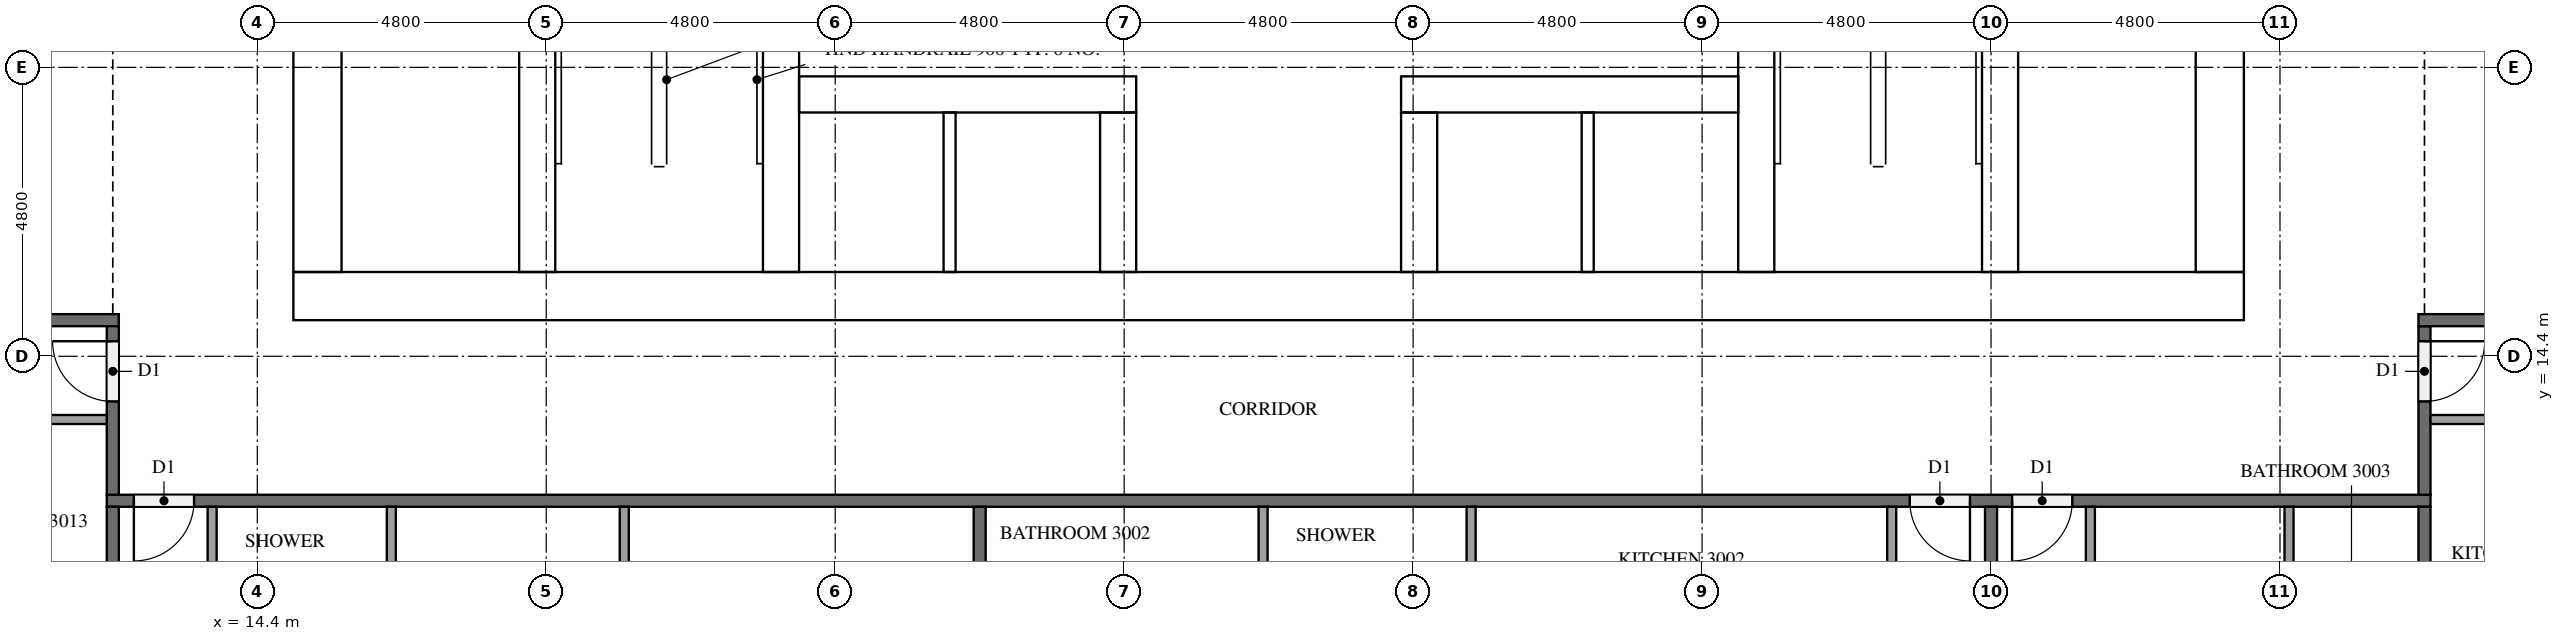
"""IFC4 building model, lengths in metres.
Left out: names, types, materials, properties, quantities, classifications, styles, units other than length and angle.
Written with IfcOpenShell. Run it as: python <this file> out.ifc"""

import sys

from ifc_helpers import new_model, si_unit, direction, frame, frame_2d, origin, place, context, subcontext, project, spatial, rectangle, extrude, element, fill, save


model = new_model("IFC4")
c1 = context("Model", 3, precision=1e-05, world=origin(), true_north=direction((0.0, 1.0)))
c2 = subcontext(c1, "Body", "Model", "MODEL_VIEW")
j1 = project(units=[si_unit("LENGTHUNIT", "METRE"), si_unit("PLANEANGLEUNIT", "RADIAN")], contexts=[c1])
p1 = place(None, origin())
s1 = spatial("IfcSite", under=j1, at=p1, CompositionType="ELEMENT")
p2 = place(p1, origin())
s2 = spatial("IfcBuilding", under=s1, at=p2, CompositionType="ELEMENT")
p3 = place(p2, frame((0.0, 0.0, 119.1)))
s3 = spatial("IfcBuildingStorey", under=s2, at=p3, CompositionType="ELEMENT", Elevation=119.1)
p4 = place(p3, frame((15.0, 15.4, 0.0), z_axis=(0.0, 0.0, 1.0), x_axis=(1.0, 0.0, 0.0)))
e1 = element("IfcWall", 1, at=p4, inside=s3, PredefinedType="SHEAR", context=c2, shape_type="SweptSolid", body=[
    extrude(rectangle(XDim=32.4, YDim=0.8, at=frame_2d((16.2, 0.0))), origin(), (0.0, 0.0, 1.0), 3.2),
])
p5 = place(p4, frame((15.3, 0.0, 0.0)))
e2 = element("IfcOpeningElement", 2, at=p5, cuts=e1, PredefinedType="OPENING", context=c2, shape_type="SweptSolid", body=[
    extrude(rectangle(XDim=1.8, YDim=2.1, at=frame_2d((0.9, 1.05))), frame((0.0, 0.41, 0.0), z_axis=(0.0, -1.0, 0.0), x_axis=(1.0, 0.0, 0.0)), (0.0, 0.0, 1.0), 0.82),
])
p6 = place(p3, frame((15.4, 15.8, 0.0), z_axis=(0.0, 0.0, 1.0), x_axis=(0.0, 1.0, 0.0)))
e3 = element("IfcWall", 3, at=p6, inside=s3, PredefinedType="SHEAR", context=c2, shape_type="SweptSolid", body=[
    extrude(rectangle(XDim=21.2, YDim=0.8, at=frame_2d((10.6, 0.0))), origin(), (0.0, 0.0, 1.0), 3.2),
])
p7 = place(p6, frame((4.96, 0.0, 0.0)))
e4 = element("IfcOpeningElement", 4, at=p7, cuts=e3, PredefinedType="OPENING", context=c2, shape_type="SweptSolid", body=[
    extrude(rectangle(XDim=1.2, YDim=2.1, at=frame_2d((0.6, 1.05))), frame((0.0, 0.41, 0.0), z_axis=(0.0, -1.0, 0.0), x_axis=(1.0, 0.0, 0.0)), (0.0, 0.0, 1.0), 0.82),
])
p8 = place(p3, frame((47.0, 15.8, 0.0), z_axis=(0.0, 0.0, 1.0), x_axis=(0.0, 1.0, 0.0)))
e5 = element("IfcWall", 5, at=p8, inside=s3, PredefinedType="SHEAR", context=c2, shape_type="SweptSolid", body=[
    extrude(rectangle(XDim=21.2, YDim=0.8, at=frame_2d((10.6, 0.0))), origin(), (0.0, 0.0, 1.0), 3.2),
])
p9 = place(p8, frame((10.3, 0.0, 0.0)))
e6 = element("IfcOpeningElement", 6, at=p9, cuts=e5, PredefinedType="OPENING", context=c2, shape_type="SweptSolid", body=[
    extrude(rectangle(XDim=1.2, YDim=2.1, at=frame_2d((0.6, 1.05))), frame((0.0, 0.41, 0.0), z_axis=(0.0, -1.0, 0.0), x_axis=(1.0, 0.0, 0.0)), (0.0, 0.0, 1.0), 0.82),
])
p10 = place(p3, frame((19.05, 15.8, 0.0), z_axis=(0.0, 0.0, 1.0), x_axis=(0.0, 1.0, 0.0)))
e7 = element("IfcWall", 7, at=p10, inside=s3, PredefinedType="SHEAR", context=c2, shape_type="SweptSolid", body=[
    extrude(rectangle(XDim=15.15, YDim=0.6, at=frame_2d((7.575, 0.0))), origin(), (0.0, 0.0, 1.0), 3.2),
])
p11 = place(p10, frame((9.65, 0.0, 0.0)))
e8 = element("IfcOpeningElement", 8, at=p11, cuts=e7, PredefinedType="OPENING", context=c2, shape_type="SweptSolid", body=[
    extrude(rectangle(XDim=1.1, YDim=2.1, at=frame_2d((0.55, 1.05))), frame((0.0, 0.31, 0.0), z_axis=(0.0, -1.0, 0.0), x_axis=(1.0, 0.0, 0.0)), (0.0, 0.0, 1.0), 0.62),
])
p12 = place(p10, frame((13.15, 0.0, 0.0)))
e9 = element("IfcOpeningElement", 9, at=p12, cuts=e7, PredefinedType="OPENING", context=c2, shape_type="SweptSolid", body=[
    extrude(rectangle(XDim=1.1, YDim=2.1, at=frame_2d((0.55, 1.05))), frame((0.0, 0.31, 0.0), z_axis=(0.0, -1.0, 0.0), x_axis=(1.0, 0.0, 0.0)), (0.0, 0.0, 1.0), 0.62),
])
p13 = place(p10, frame((0.4, 0.0, 0.0)))
e10 = element("IfcOpeningElement", 10, at=p13, cuts=e7, PredefinedType="OPENING", context=c2, shape_type="SweptSolid", body=[
    extrude(rectangle(XDim=1.2, YDim=2.1, at=frame_2d((0.6, 1.05))), frame((0.0, 0.31, 0.0), z_axis=(0.0, -1.0, 0.0), x_axis=(1.0, 0.0, 0.0)), (0.0, 0.0, 1.0), 0.62),
])
p14 = place(p3, frame((23.1, 15.8, 0.0), z_axis=(0.0, 0.0, 1.0), x_axis=(0.0, 1.0, 0.0)))
e11 = element("IfcWall", 11, at=p14, inside=s3, PredefinedType="SHEAR", context=c2, shape_type="SweptSolid", body=[
    extrude(rectangle(XDim=21.2, YDim=0.6, at=frame_2d((10.6, 0.0))), origin(), (0.0, 0.0, 1.0), 3.2),
])
p15 = place(p3, frame((39.3, 15.8, 0.0), z_axis=(0.0, 0.0, 1.0), x_axis=(0.0, 1.0, 0.0)))
e12 = element("IfcWall", 12, at=p15, inside=s3, PredefinedType="SHEAR", context=c2, shape_type="SweptSolid", body=[
    extrude(rectangle(XDim=8.45, YDim=0.6, at=frame_2d((4.225, 0.0))), origin(), (0.0, 0.0, 1.0), 3.2),
])
p16 = place(p3, frame((43.35, 15.8, 0.0), z_axis=(0.0, 0.0, 1.0), x_axis=(0.0, 1.0, 0.0)))
e13 = element("IfcWall", 13, at=p16, inside=s3, PredefinedType="SHEAR", context=c2, shape_type="SweptSolid", body=[
    extrude(rectangle(XDim=8.45, YDim=0.6, at=frame_2d((4.225, 0.0))), origin(), (0.0, 0.0, 1.0), 3.2),
])
p17 = place(p16, frame((0.4, 0.0, 0.0)))
e14 = element("IfcOpeningElement", 14, at=p17, cuts=e13, PredefinedType="OPENING", context=c2, shape_type="SweptSolid", body=[
    extrude(rectangle(XDim=1.2, YDim=2.1, at=frame_2d((0.6, 1.05))), frame((0.0, 0.31, 0.0), z_axis=(0.0, -1.0, 0.0), x_axis=(1.0, 0.0, 0.0)), (0.0, 0.0, 1.0), 0.62),
])
p18 = place(p3, frame((23.4, 18.75, 0.0), z_axis=(0.0, 0.0, 1.0), x_axis=(1.0, 0.0, 0.0)))
e15 = element("IfcWall", 15, at=p18, inside=s3, PredefinedType="SHEAR", context=c2, shape_type="SweptSolid", body=[
    extrude(rectangle(XDim=5.6, YDim=0.6, at=frame_2d((2.8, 0.0))), origin(), (0.0, 0.0, 1.0), 3.2),
])
p19 = place(p18, frame((0.65, 0.0, 0.0)))
e16 = element("IfcOpeningElement", 16, at=p19, cuts=e15, PredefinedType="OPENING", context=c2, shape_type="SweptSolid", body=[
    extrude(rectangle(XDim=1.1, YDim=2.1, at=frame_2d((0.55, 1.05))), frame((0.0, 0.31, 0.0), z_axis=(0.0, -1.0, 0.0), x_axis=(1.0, 0.0, 0.0)), (0.0, 0.0, 1.0), 0.62),
])
p20 = place(p18, frame((3.25, 0.0, 0.0)))
e17 = element("IfcOpeningElement", 17, at=p20, cuts=e15, PredefinedType="OPENING", context=c2, shape_type="SweptSolid", body=[
    extrude(rectangle(XDim=1.1, YDim=2.1, at=frame_2d((0.55, 1.05))), frame((0.0, 0.31, 0.0), z_axis=(0.0, -1.0, 0.0), x_axis=(1.0, 0.0, 0.0)), (0.0, 0.0, 1.0), 0.62),
])
p21 = place(p3, frame((33.4, 18.75, 0.0), z_axis=(0.0, 0.0, 1.0), x_axis=(1.0, 0.0, 0.0)))
e18 = element("IfcWall", 18, at=p21, inside=s3, PredefinedType="SHEAR", context=c2, shape_type="SweptSolid", body=[
    extrude(rectangle(XDim=5.6, YDim=0.6, at=frame_2d((2.8, 0.0))), origin(), (0.0, 0.0, 1.0), 3.2),
])
p22 = place(p21, frame((1.25, 0.0, 0.0)))
e19 = element("IfcOpeningElement", 19, at=p22, cuts=e18, PredefinedType="OPENING", context=c2, shape_type="SweptSolid", body=[
    extrude(rectangle(XDim=1.1, YDim=2.1, at=frame_2d((0.55, 1.05))), frame((0.0, 0.31, 0.0), z_axis=(0.0, -1.0, 0.0), x_axis=(1.0, 0.0, 0.0)), (0.0, 0.0, 1.0), 0.62),
])
p23 = place(p21, frame((3.85, 0.0, 0.0)))
e20 = element("IfcOpeningElement", 20, at=p23, cuts=e18, PredefinedType="OPENING", context=c2, shape_type="SweptSolid", body=[
    extrude(rectangle(XDim=1.1, YDim=2.1, at=frame_2d((0.55, 1.05))), frame((0.0, 0.31, 0.0), z_axis=(0.0, -1.0, 0.0), x_axis=(1.0, 0.0, 0.0)), (0.0, 0.0, 1.0), 0.62),
])
for number, where, z_axis, x_axis in (
    (21, (28.7, 15.8, 0.0), (0.0, 0.0, 1.0), (0.0, 1.0, 0.0)),
    (22, (33.7, 15.8, 0.0), (0.0, 0.0, 1.0), (0.0, 1.0, 0.0)),
):
    element("IfcWall", number, at=place(p3, frame(where, z_axis=z_axis, x_axis=x_axis)), inside=s3, PredefinedType="SHEAR", context=c2, shape_type="SweptSolid", body=[
        extrude(rectangle(XDim=2.65, YDim=0.6, at=frame_2d((1.325, 0.0))), origin(), (0.0, 0.0, 1.0), 3.2),
    ])
for number, where, z_axis, x_axis in (
    (23, (25.9, 15.8, 0.0), (0.0, 0.0, 1.0), (0.0, 1.0, 0.0)),
    (24, (36.5, 15.8, 0.0), (0.0, 0.0, 1.0), (0.0, 1.0, 0.0)),
):
    element("IfcWall", number, at=place(p3, frame(where, z_axis=z_axis, x_axis=x_axis)), inside=s3, PredefinedType="SOLIDWALL", context=c2, shape_type="SweptSolid", body=[
        extrude(rectangle(XDim=2.65, YDim=0.2, at=frame_2d((1.325, 0.0))), origin(), (0.0, 0.0, 1.0), 3.2),
    ])
p24 = place(p3, frame((50.5, 12.0, 0.0), z_axis=(0.0, 0.0, 1.0), x_axis=(-1.0, 0.0, 0.0)))
e25 = element("IfcWall", 25, at=p24, inside=s3, PredefinedType="PARTITIONING", context=c2, shape_type="SweptSolid", body=[
    extrude(rectangle(XDim=38.6, YDim=0.2, at=frame_2d((19.3, 0.0))), origin(), (0.0, 0.0, 1.0), 3.2),
])
p25 = place(p24, frame((37.15, 0.0, 0.0)))
e26 = element("IfcOpeningElement", 26, at=p25, cuts=e25, PredefinedType="OPENING", context=c2, shape_type="SweptSolid", body=[
    extrude(rectangle(XDim=1.0, YDim=2.1, at=frame_2d((0.5, 1.05))), frame((0.0, 0.11, 0.0), z_axis=(0.0, -1.0, 0.0), x_axis=(1.0, 0.0, 0.0)), (0.0, 0.0, 1.0), 0.22),
])
p26 = place(p24, frame((7.65, 0.0, 0.0)))
e27 = element("IfcOpeningElement", 27, at=p26, cuts=e25, PredefinedType="OPENING", context=c2, shape_type="SweptSolid", body=[
    extrude(rectangle(XDim=1.0, YDim=2.1, at=frame_2d((0.5, 1.05))), frame((0.0, 0.11, 0.0), z_axis=(0.0, -1.0, 0.0), x_axis=(1.0, 0.0, 0.0)), (0.0, 0.0, 1.0), 0.22),
])
p27 = place(p24, frame((5.95, 0.0, 0.0)))
e28 = element("IfcOpeningElement", 28, at=p27, cuts=e25, PredefinedType="OPENING", context=c2, shape_type="SweptSolid", body=[
    extrude(rectangle(XDim=1.0, YDim=2.1, at=frame_2d((0.5, 1.05))), frame((0.0, 0.11, 0.0), z_axis=(0.0, -1.0, 0.0), x_axis=(1.0, 0.0, 0.0)), (0.0, 0.0, 1.0), 0.22),
])
p28 = place(p3, frame((50.4, 14.9, 0.0), z_axis=(0.0, 0.0, 1.0), x_axis=(0.0, -1.0, 0.0)))
e29 = element("IfcWall", 29, at=p28, inside=s3, PredefinedType="PARTITIONING", context=c2, shape_type="SweptSolid", body=[
    extrude(rectangle(XDim=2.8, YDim=0.2, at=frame_2d((1.4, 0.0))), origin(), (0.0, 0.0, 1.0), 3.2),
])
p29 = place(p28, frame((0.25, 0.0, 0.0)))
e30 = element("IfcOpeningElement", 30, at=p29, cuts=e29, PredefinedType="OPENING", context=c2, shape_type="SweptSolid", body=[
    extrude(rectangle(XDim=1.0, YDim=2.1, at=frame_2d((0.5, 1.05))), frame((0.0, 0.11, 0.0), z_axis=(0.0, -1.0, 0.0), x_axis=(1.0, 0.0, 0.0)), (0.0, 0.0, 1.0), 0.22),
])
p30 = place(p3, frame((50.3, 15.0, 0.0), z_axis=(0.0, 0.0, 1.0), x_axis=(1.0, 0.0, 0.0)))
e31 = element("IfcWall", 31, at=p30, inside=s3, PredefinedType="PARTITIONING", context=c2, shape_type="SweptSolid", body=[
    extrude(rectangle(XDim=2.2, YDim=0.2, at=frame_2d((1.1, 0.0))), origin(), (0.0, 0.0, 1.0), 3.2),
])
p31 = place(p3, frame((9.9, 15.0, 0.0), z_axis=(0.0, 0.0, 1.0), x_axis=(1.0, 0.0, 0.0)))
e32 = element("IfcWall", 32, at=p31, inside=s3, PredefinedType="PARTITIONING", context=c2, shape_type="SweptSolid", body=[
    extrude(rectangle(XDim=2.2, YDim=0.2, at=frame_2d((1.1, 0.0))), origin(), (0.0, 0.0, 1.0), 3.2),
])
p32 = place(p3, frame((12.0, 12.1, 0.0), z_axis=(0.0, 0.0, 1.0), x_axis=(0.0, 1.0, 0.0)))
e33 = element("IfcWall", 33, at=p32, inside=s3, PredefinedType="PARTITIONING", context=c2, shape_type="SweptSolid", body=[
    extrude(rectangle(XDim=2.8, YDim=0.2, at=frame_2d((1.4, 0.0))), origin(), (0.0, 0.0, 1.0), 3.2),
])
p33 = place(p32, frame((1.55, 0.0, 0.0)))
e34 = element("IfcOpeningElement", 34, at=p33, cuts=e33, PredefinedType="OPENING", context=c2, shape_type="SweptSolid", body=[
    extrude(rectangle(XDim=1.0, YDim=2.1, at=frame_2d((0.5, 1.05))), frame((0.0, 0.11, 0.0), z_axis=(0.0, -1.0, 0.0), x_axis=(1.0, 0.0, 0.0)), (0.0, 0.0, 1.0), 0.22),
])
for number, where, z_axis, x_axis in (
    (35, (26.4, 11.9, 0.0), (0.0, 0.0, 1.0), (0.0, -1.0, 0.0)),
    (36, (12.0, 4.9, 0.0), (0.0, 0.0, 1.0), (0.0, 1.0, 0.0)),
):
    element("IfcWall", number, at=place(p3, frame(where, z_axis=z_axis, x_axis=x_axis)), inside=s3, PredefinedType="PARTITIONING", context=c2, shape_type="SweptSolid", body=[
        extrude(rectangle(XDim=7.0, YDim=0.2, at=frame_2d((3.5, 0.0))), origin(), (0.0, 0.0, 1.0), 3.2),
    ])
p34 = place(p3, frame((43.2, 11.9, 0.0), z_axis=(0.0, 0.0, 1.0), x_axis=(0.0, -1.0, 0.0)))
e37 = element("IfcWall", 37, at=p34, inside=s3, PredefinedType="PARTITIONING", context=c2, shape_type="SweptSolid", body=[
    extrude(rectangle(XDim=6.725, YDim=0.2, at=frame_2d((3.362, 0.0))), origin(), (0.0, 0.0, 1.0), 3.2),
])
p35 = place(p3, frame((50.4, 11.9, 0.0), z_axis=(0.0, 0.0, 1.0), x_axis=(0.0, -1.0, 0.0)))
e38 = element("IfcWall", 38, at=p35, inside=s3, PredefinedType="PARTITIONING", context=c2, shape_type="SweptSolid", body=[
    extrude(rectangle(XDim=7.0, YDim=0.2, at=frame_2d((3.5, 0.0))), origin(), (0.0, 0.0, 1.0), 3.2),
])
for number, where, z_axis, x_axis in (
    (39, (16.627, 11.9, 0.0), (0.0, 0.0, 1.0), (0.0, -1.0, 0.0)),
    (40, (20.496, 11.9, 0.0), (0.0, 0.0, 1.0), (0.0, -1.0, 0.0)),
):
    element("IfcWall", number, at=place(p3, frame(where, z_axis=z_axis, x_axis=x_axis)), inside=s3, PredefinedType="PARTITIONING", context=c2, shape_type="SweptSolid", body=[
        extrude(rectangle(XDim=2.225, YDim=0.15, at=frame_2d((1.112, 0.0))), origin(), (0.0, 0.0, 1.0), 3.2),
    ])
p36 = place(p3, frame((13.65, 11.9, 0.0), z_axis=(0.0, 0.0, 1.0), x_axis=(0.0, -1.0, 0.0)))
e41 = element("IfcWall", 41, at=p36, inside=s3, PredefinedType="PARTITIONING", context=c2, shape_type="SweptSolid", body=[
    extrude(rectangle(XDim=2.375, YDim=0.15, at=frame_2d((1.188, 0.0))), origin(), (0.0, 0.0, 1.0), 3.2),
])
for number, where, z_axis, x_axis in (
    (42, (34.563, 11.9, 0.0), (0.0, 0.0, 1.0), (0.0, -1.0, 0.0)),
    (43, (31.108, 11.9, 0.0), (0.0, 0.0, 1.0), (0.0, -1.0, 0.0)),
):
    element("IfcWall", number, at=place(p3, frame(where, z_axis=z_axis, x_axis=x_axis)), inside=s3, PredefinedType="PARTITIONING", context=c2, shape_type="SweptSolid", body=[
        extrude(rectangle(XDim=1.775, YDim=0.15, at=frame_2d((0.887, 0.0))), origin(), (0.0, 0.0, 1.0), 3.2),
    ])
p37 = place(p3, frame((41.55, 11.9, 0.0), z_axis=(0.0, 0.0, 1.0), x_axis=(0.0, -1.0, 0.0)))
e44 = element("IfcWall", 44, at=p37, inside=s3, PredefinedType="PARTITIONING", context=c2, shape_type="SweptSolid", body=[
    extrude(rectangle(XDim=1.925, YDim=0.15, at=frame_2d((0.962, 0.0))), origin(), (0.0, 0.0, 1.0), 3.2),
])
p38 = place(p3, frame((48.15, 11.9, 0.0), z_axis=(0.0, 0.0, 1.0), x_axis=(0.0, -1.0, 0.0)))
e45 = element("IfcWall", 45, at=p38, inside=s3, PredefinedType="PARTITIONING", context=c2, shape_type="SweptSolid", body=[
    extrude(rectangle(XDim=2.375, YDim=0.15, at=frame_2d((1.188, 0.0))), origin(), (0.0, 0.0, 1.0), 3.2),
])
p39 = place(p3, frame((44.85, 11.9, 0.0), z_axis=(0.0, 0.0, 1.0), x_axis=(0.0, -1.0, 0.0)))
e46 = element("IfcWall", 46, at=p39, inside=s3, PredefinedType="PARTITIONING", context=c2, shape_type="SweptSolid", body=[
    extrude(rectangle(XDim=2.525, YDim=0.15, at=frame_2d((1.262, 0.0))), origin(), (0.0, 0.0, 1.0), 3.2),
])
p40 = place(p3, frame((50.5, 13.35, 0.0), z_axis=(0.0, 0.0, 1.0), x_axis=(1.0, 0.0, 0.0)))
e47 = element("IfcWall", 47, at=p40, inside=s3, PredefinedType="PARTITIONING", context=c2, shape_type="SweptSolid", body=[
    extrude(rectangle(XDim=2.225, YDim=0.15, at=frame_2d((1.113, 0.0))), origin(), (0.0, 0.0, 1.0), 3.2),
])
p41 = place(p3, frame((11.9, 13.35, 0.0), z_axis=(0.0, 0.0, 1.0), x_axis=(-1.0, 0.0, 0.0)))
e48 = element("IfcWall", 48, at=p41, inside=s3, PredefinedType="PARTITIONING", context=c2, shape_type="SweptSolid", body=[
    extrude(rectangle(XDim=3.275, YDim=0.15, at=frame_2d((1.637, 0.0))), origin(), (0.0, 0.0, 1.0), 3.2),
])
p42 = place(p19, origin())
e49 = element("IfcDoor", 49, at=p42, inside=s3, OperationType="DOUBLE_DOOR_SLIDING", PredefinedType="DOOR", context=c2, shape_type="SweptSolid", body=[
    extrude(rectangle(XDim=1.1, YDim=2.1, at=frame_2d((0.55, 1.05))), frame((0.0, 0.025, 0.0), z_axis=(0.0, -1.0, 0.0), x_axis=(1.0, 0.0, 0.0)), (0.0, 0.0, 1.0), 0.05),
])
fill(e16, e49)
p43 = place(p20, origin())
e50 = element("IfcDoor", 50, at=p43, inside=s3, OperationType="DOUBLE_DOOR_SLIDING", PredefinedType="DOOR", context=c2, shape_type="SweptSolid", body=[
    extrude(rectangle(XDim=1.1, YDim=2.1, at=frame_2d((0.55, 1.05))), frame((0.0, 0.025, 0.0), z_axis=(0.0, -1.0, 0.0), x_axis=(1.0, 0.0, 0.0)), (0.0, 0.0, 1.0), 0.05),
])
fill(e17, e50)
p44 = place(p22, origin())
e51 = element("IfcDoor", 51, at=p44, inside=s3, OperationType="DOUBLE_DOOR_SLIDING", PredefinedType="DOOR", context=c2, shape_type="SweptSolid", body=[
    extrude(rectangle(XDim=1.1, YDim=2.1, at=frame_2d((0.55, 1.05))), frame((0.0, 0.025, 0.0), z_axis=(0.0, -1.0, 0.0), x_axis=(1.0, 0.0, 0.0)), (0.0, 0.0, 1.0), 0.05),
])
fill(e19, e51)
p45 = place(p23, origin())
e52 = element("IfcDoor", 52, at=p45, inside=s3, OperationType="DOUBLE_DOOR_SLIDING", PredefinedType="DOOR", context=c2, shape_type="SweptSolid", body=[
    extrude(rectangle(XDim=1.1, YDim=2.1, at=frame_2d((0.55, 1.05))), frame((0.0, 0.025, 0.0), z_axis=(0.0, -1.0, 0.0), x_axis=(1.0, 0.0, 0.0)), (0.0, 0.0, 1.0), 0.05),
])
fill(e20, e52)
p46 = place(p13, frame((1.2, 0.0, 0.0), z_axis=(0.0, 0.0, 1.0), x_axis=(-1.0, 0.0, 0.0)))
e53 = element("IfcDoor", 53, at=p46, inside=s3, OperationType="SINGLE_SWING_RIGHT", PredefinedType="DOOR", context=c2, shape_type="SweptSolid", body=[
    extrude(rectangle(XDim=1.2, YDim=2.1, at=frame_2d((0.6, 1.05))), frame((0.0, 0.025, 0.0), z_axis=(0.0, -1.0, 0.0), x_axis=(1.0, 0.0, 0.0)), (0.0, 0.0, 1.0), 0.05),
])
fill(e10, e53)
p47 = place(p17, origin())
e54 = element("IfcDoor", 54, at=p47, inside=s3, OperationType="SINGLE_SWING_LEFT", PredefinedType="DOOR", context=c2, shape_type="SweptSolid", body=[
    extrude(rectangle(XDim=1.2, YDim=2.1, at=frame_2d((0.6, 1.05))), frame((0.0, 0.025, 0.0), z_axis=(0.0, -1.0, 0.0), x_axis=(1.0, 0.0, 0.0)), (0.0, 0.0, 1.0), 0.05),
])
fill(e14, e54)
p48 = place(p5, frame((1.8, 0.0, 0.0), z_axis=(0.0, 0.0, 1.0), x_axis=(-1.0, 0.0, 0.0)))
e55 = element("IfcDoor", 55, at=p48, inside=s3, OperationType="DOUBLE_DOOR_SINGLE_SWING", PredefinedType="DOOR", context=c2, shape_type="SweptSolid", body=[
    extrude(rectangle(XDim=1.8, YDim=2.1, at=frame_2d((0.9, 1.05))), frame((0.0, 0.025, 0.0), z_axis=(0.0, -1.0, 0.0), x_axis=(1.0, 0.0, 0.0)), (0.0, 0.0, 1.0), 0.05),
])
fill(e2, e55)
p49 = place(p25, origin())
e56 = element("IfcDoor", 56, at=p49, inside=s3, OperationType="SINGLE_SWING_RIGHT", PredefinedType="DOOR", context=c2, shape_type="SweptSolid", body=[
    extrude(rectangle(XDim=1.0, YDim=2.1, at=frame_2d((0.5, 1.05))), frame((0.0, 0.025, 0.0), z_axis=(0.0, -1.0, 0.0), x_axis=(1.0, 0.0, 0.0)), (0.0, 0.0, 1.0), 0.05),
])
fill(e26, e56)
p50 = place(p26, origin())
e57 = element("IfcDoor", 57, at=p50, inside=s3, OperationType="SINGLE_SWING_LEFT", PredefinedType="DOOR", context=c2, shape_type="SweptSolid", body=[
    extrude(rectangle(XDim=1.0, YDim=2.1, at=frame_2d((0.5, 1.05))), frame((0.0, 0.025, 0.0), z_axis=(0.0, -1.0, 0.0), x_axis=(1.0, 0.0, 0.0)), (0.0, 0.0, 1.0), 0.05),
])
fill(e27, e57)
p51 = place(p27, origin())
e58 = element("IfcDoor", 58, at=p51, inside=s3, OperationType="SINGLE_SWING_RIGHT", PredefinedType="DOOR", context=c2, shape_type="SweptSolid", body=[
    extrude(rectangle(XDim=1.0, YDim=2.1, at=frame_2d((0.5, 1.05))), frame((0.0, 0.025, 0.0), z_axis=(0.0, -1.0, 0.0), x_axis=(1.0, 0.0, 0.0)), (0.0, 0.0, 1.0), 0.05),
])
fill(e28, e58)
p52 = place(p29, origin())
e59 = element("IfcDoor", 59, at=p52, inside=s3, OperationType="SINGLE_SWING_LEFT", PredefinedType="DOOR", context=c2, shape_type="SweptSolid", body=[
    extrude(rectangle(XDim=1.0, YDim=2.1, at=frame_2d((0.5, 1.05))), frame((0.0, 0.025, 0.0), z_axis=(0.0, -1.0, 0.0), x_axis=(1.0, 0.0, 0.0)), (0.0, 0.0, 1.0), 0.05),
])
fill(e30, e59)
p53 = place(p33, origin())
e60 = element("IfcDoor", 60, at=p53, inside=s3, OperationType="SINGLE_SWING_RIGHT", PredefinedType="DOOR", context=c2, shape_type="SweptSolid", body=[
    extrude(rectangle(XDim=1.0, YDim=2.1, at=frame_2d((0.5, 1.05))), frame((0.0, 0.025, 0.0), z_axis=(0.0, -1.0, 0.0), x_axis=(1.0, 0.0, 0.0)), (0.0, 0.0, 1.0), 0.05),
])
fill(e34, e60)
save(model, sys.argv[1])
